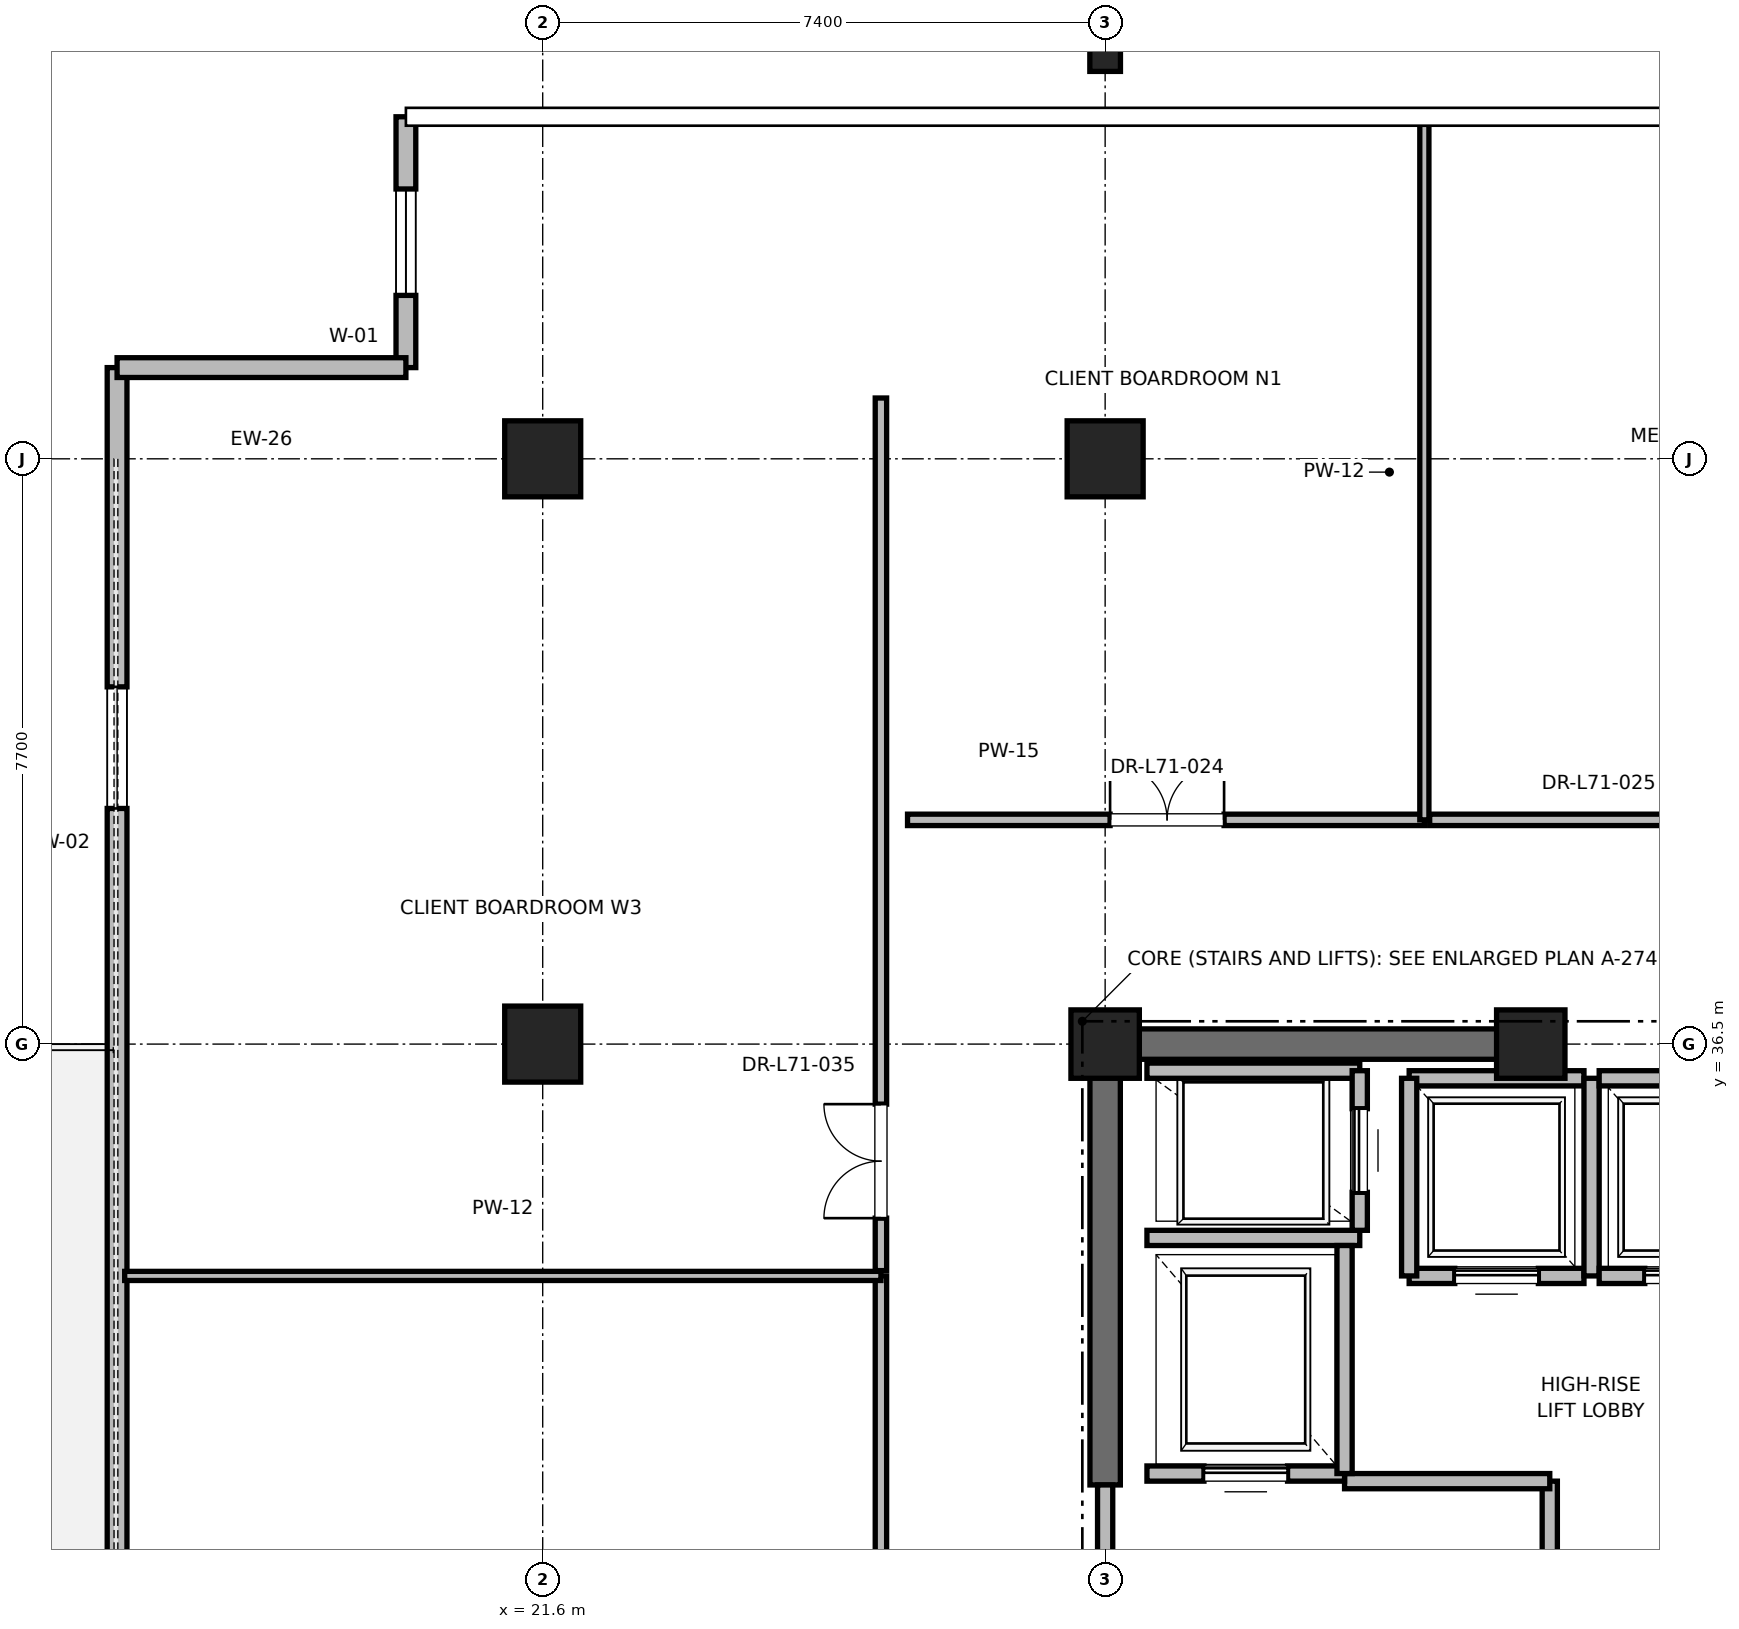
"""IFC4 building model, lengths in metres.
Left out: names, types, materials, properties, quantities, classifications, styles, units other than length and angle.
Written with IfcOpenShell. Run it as: python <this file> out.ifc"""

import sys

from ifc_helpers import new_model, si_unit, direction, frame, frame_2d, origin, origin_2d, place, context, subcontext, project, spatial, rectangle, i_section, extrude, element, fill, save


model = new_model("IFC4")
c1 = context("Model", 3, precision=1e-05, world=origin(), true_north=direction((0.0, 1.0)))
c2 = subcontext(c1, "Body", "Model", "MODEL_VIEW")
j1 = project(units=[si_unit("LENGTHUNIT", "METRE"), si_unit("PLANEANGLEUNIT", "RADIAN")], contexts=[c1])
p1 = place(None, origin())
s1 = spatial("IfcSite", under=j1, at=p1, CompositionType="ELEMENT")
p2 = place(p1, origin())
s2 = spatial("IfcBuilding", under=s1, at=p2, CompositionType="ELEMENT")
p3 = place(p2, frame((0.0, 0.0, 306.8)))
s3 = spatial("IfcBuildingStorey", under=s2, at=p3, CompositionType="ELEMENT", Elevation=306.8)
for number, where, z_axis, x_axis in (
    (1, (29.0, 44.2, 0.0), (0.0, 0.0, 1.0), (1.0, 0.0, 0.0)),
    (2, (21.6, 36.5, 0.0), (0.0, 0.0, 1.0), (1.0, 0.0, 0.0)),
    (3, (21.6, 44.2, 0.0), (0.0, 0.0, 1.0), (1.0, 0.0, 0.0)),
):
    element("IfcColumn", number, at=place(p3, frame(where, z_axis=z_axis, x_axis=x_axis)), inside=s3, PredefinedType="COLUMN", context=c2, shape_type="SweptSolid", body=[
        extrude(rectangle(XDim=1.0, YDim=1.0, at=origin_2d()), origin(), (0.0, 0.0, 1.0), 4.0),
    ])
p4 = place(p3, frame((29.0, 49.5, 0.0), z_axis=(0.0, 0.0, 1.0), x_axis=(1.0, 0.0, 0.0)))
e4 = element("IfcColumn", 4, at=p4, inside=s3, PredefinedType="COLUMN", context=c2, shape_type="SweptSolid", body=[
    extrude(i_section(OverallWidth=0.403, OverallDepth=0.406, WebThickness=0.027, FlangeThickness=0.043, FilletRadius=0.015, at=origin_2d()), origin(), (0.0, 0.0, 1.0), 4.0),
])
for number, where, z_axis, x_axis in (
    (5, (29.0, 36.5, 0.0), (0.0, 0.0, 1.0), (1.0, 0.0, 0.0)),
    (6, (34.6, 36.5, 0.0), (0.0, 0.0, 1.0), (1.0, 0.0, 0.0)),
):
    element("IfcColumn", number, at=place(p3, frame(where, z_axis=z_axis, x_axis=x_axis)), inside=s3, PredefinedType="PILASTER", context=c2, shape_type="SweptSolid", body=[
        extrude(rectangle(XDim=0.9, YDim=0.9, at=origin_2d()), origin(), (0.0, 0.0, 1.0), 4.0),
    ])
for number, where, z_axis, x_axis in (
    (7, (29.0, 36.5, 0.0), (0.0, 0.0, 1.0), (1.0, 0.0, 0.0)),
    (8, (29.0, 30.7, 0.0), (0.0, 0.0, 1.0), (0.0, 1.0, 0.0)),
):
    element("IfcWall", number, at=place(p3, frame(where, z_axis=z_axis, x_axis=x_axis)), inside=s3, PredefinedType="SHEAR", context=c2, shape_type="SweptSolid", body=[
        extrude(rectangle(XDim=5.8, YDim=0.4, at=frame_2d((2.9, 0.0))), origin(), (0.0, 0.0, 1.0), 3.785),
    ])
p5 = place(p3, frame((16.0, 45.4, 0.0), z_axis=(0.0, 0.0, 1.0), x_axis=(0.0, -1.0, 0.0)))
e9 = element("IfcWall", 9, at=p5, inside=s3, PredefinedType="PARAPET", context=c2, shape_type="SweptSolid", body=[
    extrude(rectangle(XDim=35.8, YDim=0.26, at=frame_2d((17.9, 0.0))), origin(), (0.0, 0.0, 1.0), 3.196),
])
p6 = place(p5, frame((4.2, 0.0, 0.85)))
e10 = element("IfcOpeningElement", 10, at=p6, cuts=e9, PredefinedType="OPENING", context=c2, shape_type="SweptSolid", body=[
    extrude(rectangle(XDim=1.6, YDim=2.1, at=frame_2d((0.8, 1.05))), frame((0.0, 0.13, 0.0), z_axis=(0.0, -1.0, 0.0), x_axis=(1.0, 0.0, 0.0)), (0.0, 0.0, 1.0), 0.26),
])
p7 = place(p5, frame((17.3, 0.0, 0.0)))
e11 = element("IfcOpeningElement", 11, at=p7, cuts=e9, PredefinedType="OPENING", context=c2, shape_type="SweptSolid", body=[
    extrude(rectangle(XDim=1.2, YDim=2.2, at=frame_2d((0.6, 1.1))), frame((0.0, 0.13, 0.0), z_axis=(0.0, -1.0, 0.0), x_axis=(1.0, 0.0, 0.0)), (0.0, 0.0, 1.0), 0.26),
])
p8 = place(p5, frame((30.0, 0.0, 0.85)))
e12 = element("IfcOpeningElement", 12, at=p8, cuts=e9, PredefinedType="OPENING", context=c2, shape_type="SweptSolid", body=[
    extrude(rectangle(XDim=1.6, YDim=2.1, at=frame_2d((0.8, 1.05))), frame((0.0, 0.13, 0.0), z_axis=(0.0, -1.0, 0.0), x_axis=(1.0, 0.0, 0.0)), (0.0, 0.0, 1.0), 0.26),
])
p9 = place(p3, frame((19.8, 48.7, 0.0), z_axis=(0.0, 0.0, 1.0), x_axis=(0.0, -1.0, 0.0)))
e13 = element("IfcWall", 13, at=p9, inside=s3, PredefinedType="PARAPET", context=c2, shape_type="SweptSolid", body=[
    extrude(rectangle(XDim=3.3, YDim=0.26, at=frame_2d((1.65, 0.0))), origin(), (0.0, 0.0, 1.0), 3.785),
])
p10 = place(p9, frame((0.95, 0.0, 0.85)))
e14 = element("IfcOpeningElement", 14, at=p10, cuts=e13, PredefinedType="OPENING", context=c2, shape_type="SweptSolid", body=[
    extrude(rectangle(XDim=1.4, YDim=2.0, at=frame_2d((0.7, 1.0))), frame((0.0, 0.13, 0.0), z_axis=(0.0, -1.0, 0.0), x_axis=(1.0, 0.0, 0.0)), (0.0, 0.0, 1.0), 0.26),
])
p11 = place(p3, frame((19.8, 45.4, 0.0), z_axis=(0.0, 0.0, 1.0), x_axis=(-1.0, 0.0, 0.0)))
e15 = element("IfcWall", 15, at=p11, inside=s3, PredefinedType="PARAPET", context=c2, shape_type="SweptSolid", body=[
    extrude(rectangle(XDim=3.8, YDim=0.26, at=frame_2d((1.9, 0.0))), origin(), (0.0, 0.0, 1.0), 3.785),
])
p12 = place(p3, frame((34.85, 27.38, 0.0), z_axis=(0.0, 0.0, 1.0), x_axis=(0.0, 1.0, 0.0)))
e16 = element("IfcWall", 16, at=p12, inside=s3, PredefinedType="PARTITIONING", context=c2, shape_type="SweptSolid", body=[
    extrude(rectangle(XDim=3.37, YDim=0.2, at=frame_2d((1.685, 0.0))), origin(), (0.0, 0.0, 1.0), 3.785),
])
p13 = place(p12, frame((1.11, 0.0, 0.0)))
e17 = element("IfcOpeningElement", 17, at=p13, cuts=e16, PredefinedType="OPENING", context=c2, shape_type="SweptSolid", body=[
    extrude(rectangle(XDim=1.15, YDim=2.2, at=frame_2d((0.575, 1.1))), frame((0.0, 0.1, 0.0), z_axis=(0.0, -1.0, 0.0), x_axis=(1.0, 0.0, 0.0)), (0.0, 0.0, 1.0), 0.2),
])
p14 = place(p3, frame((29.0, 27.3, 0.0), z_axis=(0.0, 0.0, 1.0), x_axis=(0.0, 1.0, 0.0)))
e18 = element("IfcWall", 18, at=p14, inside=s3, PredefinedType="PARTITIONING", context=c2, shape_type="SweptSolid", body=[
    extrude(rectangle(XDim=3.4, YDim=0.2, at=frame_2d((1.7, 0.0))), origin(), (0.0, 0.0, 1.0), 2.865),
])
p15 = place(p14, frame((1.125, 0.0, 0.0)))
e19 = element("IfcOpeningElement", 19, at=p15, cuts=e18, PredefinedType="OPENING", context=c2, shape_type="SweptSolid", body=[
    extrude(rectangle(XDim=1.15, YDim=2.2, at=frame_2d((0.575, 1.1))), frame((0.0, 0.1, 0.0), z_axis=(0.0, -1.0, 0.0), x_axis=(1.0, 0.0, 0.0)), (0.0, 0.0, 1.0), 0.2),
])
p16 = place(p3, frame((32.15, 30.75, 0.0), z_axis=(0.0, 0.0, 1.0), x_axis=(1.0, 0.0, 0.0)))
e20 = element("IfcWall", 20, at=p16, inside=s3, PredefinedType="PARTITIONING", context=c2, shape_type="SweptSolid", body=[
    extrude(rectangle(XDim=2.7, YDim=0.2, at=frame_2d((1.35, 0.0))), origin(), (0.0, 0.0, 1.0), 3.785),
])
p17 = place(p3, frame((29.55, 30.85, 0.0), z_axis=(0.0, 0.0, 1.0), x_axis=(1.0, 0.0, 0.0)))
e21 = element("IfcWall", 21, at=p17, inside=s3, PredefinedType="SOLIDWALL", context=c2, shape_type="SweptSolid", body=[
    extrude(rectangle(XDim=2.6, YDim=0.2, at=frame_2d((1.3, 0.0))), origin(), (0.0, 0.0, 1.0), 2.865),
])
p18 = place(p17, frame((0.75, 0.0, 0.0)))
e22 = element("IfcOpeningElement", 22, at=p18, cuts=e21, PredefinedType="OPENING", context=c2, shape_type="SweptSolid", body=[
    extrude(rectangle(XDim=1.1, YDim=2.2, at=frame_2d((0.55, 1.1))), frame((0.0, 0.1, 0.0), z_axis=(0.0, -1.0, 0.0), x_axis=(1.0, 0.0, 0.0)), (0.0, 0.0, 1.0), 0.2),
])
p19 = place(p3, frame((29.55, 33.95, 0.0), z_axis=(0.0, 0.0, 1.0), x_axis=(1.0, 0.0, 0.0)))
e23 = element("IfcWall", 23, at=p19, inside=s3, PredefinedType="SOLIDWALL", context=c2, shape_type="SweptSolid", body=[
    extrude(rectangle(XDim=2.8, YDim=0.2, at=frame_2d((1.4, 0.0))), origin(), (0.0, 0.0, 1.0), 3.785),
])
p20 = place(p3, frame((32.15, 30.85, 0.0), z_axis=(0.0, 0.0, 1.0), x_axis=(0.0, 1.0, 0.0)))
e24 = element("IfcWall", 24, at=p20, inside=s3, PredefinedType="SOLIDWALL", context=c2, shape_type="SweptSolid", body=[
    extrude(rectangle(XDim=3.0, YDim=0.2, at=frame_2d((1.5, 0.0))), origin(), (0.0, 0.0, 1.0), 3.785),
])
p21 = place(p3, frame((32.35, 36.15, 0.0), z_axis=(0.0, 0.0, 1.0), x_axis=(-1.0, 0.0, 0.0)))
e25 = element("IfcWall", 25, at=p21, inside=s3, PredefinedType="SOLIDWALL", context=c2, shape_type="SweptSolid", body=[
    extrude(rectangle(XDim=2.8, YDim=0.2, at=frame_2d((1.4, 0.0))), origin(), (0.0, 0.0, 1.0), 3.22),
])
p22 = place(p3, frame((32.35, 34.05, 0.0), z_axis=(0.0, 0.0, 1.0), x_axis=(0.0, 1.0, 0.0)))
e26 = element("IfcWall", 26, at=p22, inside=s3, PredefinedType="SOLIDWALL", context=c2, shape_type="SweptSolid", body=[
    extrude(rectangle(XDim=2.1, YDim=0.2, at=frame_2d((1.05, 0.0))), origin(), (0.0, 0.0, 1.0), 3.785),
])
p23 = place(p22, frame((0.5, 0.0, 0.0)))
e27 = element("IfcOpeningElement", 27, at=p23, cuts=e26, PredefinedType="OPENING", context=c2, shape_type="SweptSolid", body=[
    extrude(rectangle(XDim=1.1, YDim=2.2, at=frame_2d((0.55, 1.1))), frame((0.0, 0.1, 0.0), z_axis=(0.0, -1.0, 0.0), x_axis=(1.0, 0.0, 0.0)), (0.0, 0.0, 1.0), 0.2),
])
p24 = place(p3, frame((33.0, 33.45, 0.0), z_axis=(0.0, 0.0, 1.0), x_axis=(1.0, 0.0, 0.0)))
e28 = element("IfcWall", 28, at=p24, inside=s3, PredefinedType="SOLIDWALL", context=c2, shape_type="SweptSolid", body=[
    extrude(rectangle(XDim=2.3, YDim=0.2, at=frame_2d((1.15, 0.0))), origin(), (0.0, 0.0, 1.0), 3.785),
])
p25 = place(p24, frame((0.6, 0.0, 0.0)))
e29 = element("IfcOpeningElement", 29, at=p25, cuts=e28, PredefinedType="OPENING", context=c2, shape_type="SweptSolid", body=[
    extrude(rectangle(XDim=1.1, YDim=2.2, at=frame_2d((0.55, 1.1))), frame((0.0, 0.1, 0.0), z_axis=(0.0, -1.0, 0.0), x_axis=(1.0, 0.0, 0.0)), (0.0, 0.0, 1.0), 0.2),
])
p26 = place(p3, frame((35.3, 36.05, 0.0), z_axis=(0.0, 0.0, 1.0), x_axis=(-1.0, 0.0, 0.0)))
e30 = element("IfcWall", 30, at=p26, inside=s3, PredefinedType="SOLIDWALL", context=c2, shape_type="SweptSolid", body=[
    extrude(rectangle(XDim=2.3, YDim=0.2, at=frame_2d((1.15, 0.0))), origin(), (0.0, 0.0, 1.0), 2.865),
])
p27 = place(p3, frame((33.0, 36.05, 0.0), z_axis=(0.0, 0.0, 1.0), x_axis=(0.0, -1.0, 0.0)))
e31 = element("IfcWall", 31, at=p27, inside=s3, PredefinedType="SOLIDWALL", context=c2, shape_type="SweptSolid", body=[
    extrude(rectangle(XDim=2.6, YDim=0.2, at=frame_2d((1.3, 0.0))), origin(), (0.0, 0.0, 1.0), 3.785),
])
p28 = place(p3, frame((35.4, 33.45, 0.0), z_axis=(0.0, 0.0, 1.0), x_axis=(0.0, 1.0, 0.0)))
e32 = element("IfcWall", 32, at=p28, inside=s3, PredefinedType="SOLIDWALL", context=c2, shape_type="SweptSolid", body=[
    extrude(rectangle(XDim=2.6, YDim=0.2, at=frame_2d((1.3, 0.0))), origin(), (0.0, 0.0, 1.0), 2.865),
])
p29 = place(p3, frame((35.5, 33.45, 0.0), z_axis=(0.0, 0.0, 1.0), x_axis=(1.0, 0.0, 0.0)))
e33 = element("IfcWall", 33, at=p29, inside=s3, PredefinedType="SOLIDWALL", context=c2, shape_type="SweptSolid", body=[
    extrude(rectangle(XDim=2.3, YDim=0.2, at=frame_2d((1.15, 0.0))), origin(), (0.0, 0.0, 1.0), 3.785),
])
p30 = place(p29, frame((0.6, 0.0, 0.0)))
e34 = element("IfcOpeningElement", 34, at=p30, cuts=e33, PredefinedType="OPENING", context=c2, shape_type="SweptSolid", body=[
    extrude(rectangle(XDim=1.1, YDim=2.2, at=frame_2d((0.55, 1.1))), frame((0.0, 0.1, 0.0), z_axis=(0.0, -1.0, 0.0), x_axis=(1.0, 0.0, 0.0)), (0.0, 0.0, 1.0), 0.2),
])
p31 = place(p3, frame((37.8, 36.05, 0.0), z_axis=(0.0, 0.0, 1.0), x_axis=(-1.0, 0.0, 0.0)))
e35 = element("IfcWall", 35, at=p31, inside=s3, PredefinedType="SOLIDWALL", context=c2, shape_type="SweptSolid", body=[
    extrude(rectangle(XDim=2.3, YDim=0.2, at=frame_2d((1.15, 0.0))), origin(), (0.0, 0.0, 1.0), 2.865),
])
p32 = place(p3, frame((26.4, 39.45, 0.0), z_axis=(0.0, 0.0, 1.0), x_axis=(1.0, 0.0, 0.0)))
e36 = element("IfcWall", 36, at=p32, inside=s3, PredefinedType="PARTITIONING", context=c2, shape_type="SweptSolid", body=[
    extrude(rectangle(XDim=6.8, YDim=0.15, at=frame_2d((3.4, 0.0))), origin(), (0.0, 0.0, 1.0), 2.85),
])
p33 = place(p32, frame((2.665, 0.0, 0.0)))
e37 = element("IfcOpeningElement", 37, at=p33, cuts=e36, PredefinedType="OPENING", context=c2, shape_type="SweptSolid", body=[
    extrude(rectangle(XDim=1.5, YDim=2.25, at=frame_2d((0.75, 1.125))), frame((0.0, 0.075, 0.0), z_axis=(0.0, -1.0, 0.0), x_axis=(1.0, 0.0, 0.0)), (0.0, 0.0, 1.0), 0.15),
])
p34 = place(p3, frame((33.2, 39.45, 0.0), z_axis=(0.0, 0.0, 1.0), x_axis=(0.0, 1.0, 0.0)))
e38 = element("IfcWall", 38, at=p34, inside=s3, PredefinedType="PARTITIONING", context=c2, shape_type="SweptSolid", body=[
    extrude(rectangle(XDim=9.15, YDim=0.12, at=frame_2d((4.575, 0.0))), origin(), (0.0, 0.0, 1.0), 2.415),
])
p35 = place(p3, frame((33.27, 39.45, 0.0), z_axis=(0.0, 0.0, 1.0), x_axis=(1.0, 0.0, 0.0)))
e39 = element("IfcWall", 39, at=p35, inside=s3, PredefinedType="PARTITIONING", context=c2, shape_type="SweptSolid", body=[
    extrude(rectangle(XDim=7.818, YDim=0.15, at=frame_2d((3.909, 0.0))), origin(), (0.0, 0.0, 1.0), 2.85),
])
p36 = place(p35, frame((3.374, 0.0, 0.0)))
e40 = element("IfcOpeningElement", 40, at=p36, cuts=e39, PredefinedType="OPENING", context=c2, shape_type="SweptSolid", body=[
    extrude(rectangle(XDim=1.0, YDim=2.15, at=frame_2d((0.5, 1.075))), frame((0.0, 0.075, 0.0), z_axis=(0.0, -1.0, 0.0), x_axis=(1.0, 0.0, 0.0)), (0.0, 0.0, 1.0), 0.15),
])
p37 = place(p3, frame((26.05, 20.92, 0.0), z_axis=(0.0, 0.0, 1.0), x_axis=(0.0, 1.0, 0.0)))
e41 = element("IfcWall", 41, at=p37, inside=s3, PredefinedType="PARTITIONING", context=c2, shape_type="SweptSolid", body=[
    extrude(rectangle(XDim=12.53, YDim=0.15, at=frame_2d((6.265, 0.0))), origin(), (0.0, 0.0, 1.0), 2.85),
])
p38 = place(p37, frame((5.705, 0.0, 0.0)))
e42 = element("IfcOpeningElement", 42, at=p38, cuts=e41, PredefinedType="OPENING", context=c2, shape_type="SweptSolid", body=[
    extrude(rectangle(XDim=1.05, YDim=2.2, at=frame_2d((0.525, 1.1))), frame((0.0, 0.075, 0.0), z_axis=(0.0, -1.0, 0.0), x_axis=(1.0, 0.0, 0.0)), (0.0, 0.0, 1.0), 0.15),
])
p39 = place(p3, frame((16.1, 33.45, 0.0), z_axis=(0.0, 0.0, 1.0), x_axis=(1.0, 0.0, 0.0)))
e43 = element("IfcWall", 43, at=p39, inside=s3, PredefinedType="PARTITIONING", context=c2, shape_type="SweptSolid", body=[
    extrude(rectangle(XDim=9.95, YDim=0.12, at=frame_2d((4.975, 0.0))), origin(), (0.0, 0.0, 1.0), 2.85),
])
p40 = place(p3, frame((26.05, 33.52, 0.0), z_axis=(0.0, 0.0, 1.0), x_axis=(0.0, 1.0, 0.0)))
e44 = element("IfcWall", 44, at=p40, inside=s3, PredefinedType="PARTITIONING", context=c2, shape_type="SweptSolid", body=[
    extrude(rectangle(XDim=11.48, YDim=0.15, at=frame_2d((5.74, 0.0))), origin(), (0.0, 0.0, 1.0), 2.85),
])
p41 = place(p40, frame((0.69, 0.0, 0.0)))
e45 = element("IfcOpeningElement", 45, at=p41, cuts=e44, PredefinedType="OPENING", context=c2, shape_type="SweptSolid", body=[
    extrude(rectangle(XDim=1.5, YDim=2.25, at=frame_2d((0.75, 1.125))), frame((0.0, 0.075, 0.0), z_axis=(0.0, -1.0, 0.0), x_axis=(1.0, 0.0, 0.0)), (0.0, 0.0, 1.0), 0.15),
])
p42 = place(p6, origin())
e46 = element("IfcWindow", 46, at=p42, inside=s3, PartitioningType="SINGLE_PANEL", PredefinedType="WINDOW", context=c2, shape_type="SweptSolid", body=[
    extrude(rectangle(XDim=1.6, YDim=2.1, at=frame_2d((0.8, 1.05))), frame((0.0, 0.03, 0.0), z_axis=(0.0, -1.0, 0.0), x_axis=(1.0, 0.0, 0.0)), (0.0, 0.0, 1.0), 0.06),
])
fill(e10, e46)
p43 = place(p10, origin())
e47 = element("IfcWindow", 47, at=p43, inside=s3, PartitioningType="SINGLE_PANEL", PredefinedType="WINDOW", context=c2, shape_type="SweptSolid", body=[
    extrude(rectangle(XDim=1.4, YDim=2.0, at=frame_2d((0.7, 1.0))), frame((0.0, 0.03, 0.0), z_axis=(0.0, -1.0, 0.0), x_axis=(1.0, 0.0, 0.0)), (0.0, 0.0, 1.0), 0.06),
])
fill(e14, e47)
p44 = place(p18, origin())
e48 = element("IfcDoor", 48, at=p44, inside=s3, OperationType="SLIDING_TO_RIGHT", PredefinedType="DOOR", context=c2, shape_type="SweptSolid", body=[
    extrude(rectangle(XDim=1.1, YDim=2.2, at=frame_2d((0.55, 1.1))), frame((0.0, 0.025, 0.0), z_axis=(0.0, -1.0, 0.0), x_axis=(1.0, 0.0, 0.0)), (0.0, 0.0, 1.0), 0.05),
])
fill(e22, e48)
p45 = place(p23, origin())
e49 = element("IfcDoor", 49, at=p45, inside=s3, OperationType="SLIDING_TO_RIGHT", PredefinedType="DOOR", context=c2, shape_type="SweptSolid", body=[
    extrude(rectangle(XDim=1.1, YDim=2.2, at=frame_2d((0.55, 1.1))), frame((0.0, 0.025, 0.0), z_axis=(0.0, -1.0, 0.0), x_axis=(1.0, 0.0, 0.0)), (0.0, 0.0, 1.0), 0.05),
])
fill(e27, e49)
p46 = place(p25, origin())
e50 = element("IfcDoor", 50, at=p46, inside=s3, OperationType="SLIDING_TO_RIGHT", PredefinedType="DOOR", context=c2, shape_type="SweptSolid", body=[
    extrude(rectangle(XDim=1.1, YDim=2.2, at=frame_2d((0.55, 1.1))), frame((0.0, 0.025, 0.0), z_axis=(0.0, -1.0, 0.0), x_axis=(1.0, 0.0, 0.0)), (0.0, 0.0, 1.0), 0.05),
])
fill(e29, e50)
p47 = place(p30, origin())
e51 = element("IfcDoor", 51, at=p47, inside=s3, OperationType="SLIDING_TO_RIGHT", PredefinedType="DOOR", context=c2, shape_type="SweptSolid", body=[
    extrude(rectangle(XDim=1.1, YDim=2.2, at=frame_2d((0.55, 1.1))), frame((0.0, 0.025, 0.0), z_axis=(0.0, -1.0, 0.0), x_axis=(1.0, 0.0, 0.0)), (0.0, 0.0, 1.0), 0.05),
])
fill(e34, e51)
p48 = place(p33, origin())
e52 = element("IfcDoor", 52, at=p48, inside=s3, OperationType="DOUBLE_DOOR_SINGLE_SWING", PredefinedType="DOOR", context=c2, shape_type="SweptSolid", body=[
    extrude(rectangle(XDim=1.5, YDim=2.25, at=frame_2d((0.75, 1.125))), frame((0.0, 0.025, 0.0), z_axis=(0.0, -1.0, 0.0), x_axis=(1.0, 0.0, 0.0)), (0.0, 0.0, 1.0), 0.05),
])
fill(e37, e52)
p49 = place(p41, origin())
e53 = element("IfcDoor", 53, at=p49, inside=s3, OperationType="DOUBLE_DOOR_SINGLE_SWING", PredefinedType="DOOR", context=c2, shape_type="SweptSolid", body=[
    extrude(rectangle(XDim=1.5, YDim=2.25, at=frame_2d((0.75, 1.125))), frame((0.0, 0.025, 0.0), z_axis=(0.0, -1.0, 0.0), x_axis=(1.0, 0.0, 0.0)), (0.0, 0.0, 1.0), 0.05),
])
fill(e45, e53)
save(model, sys.argv[1])
